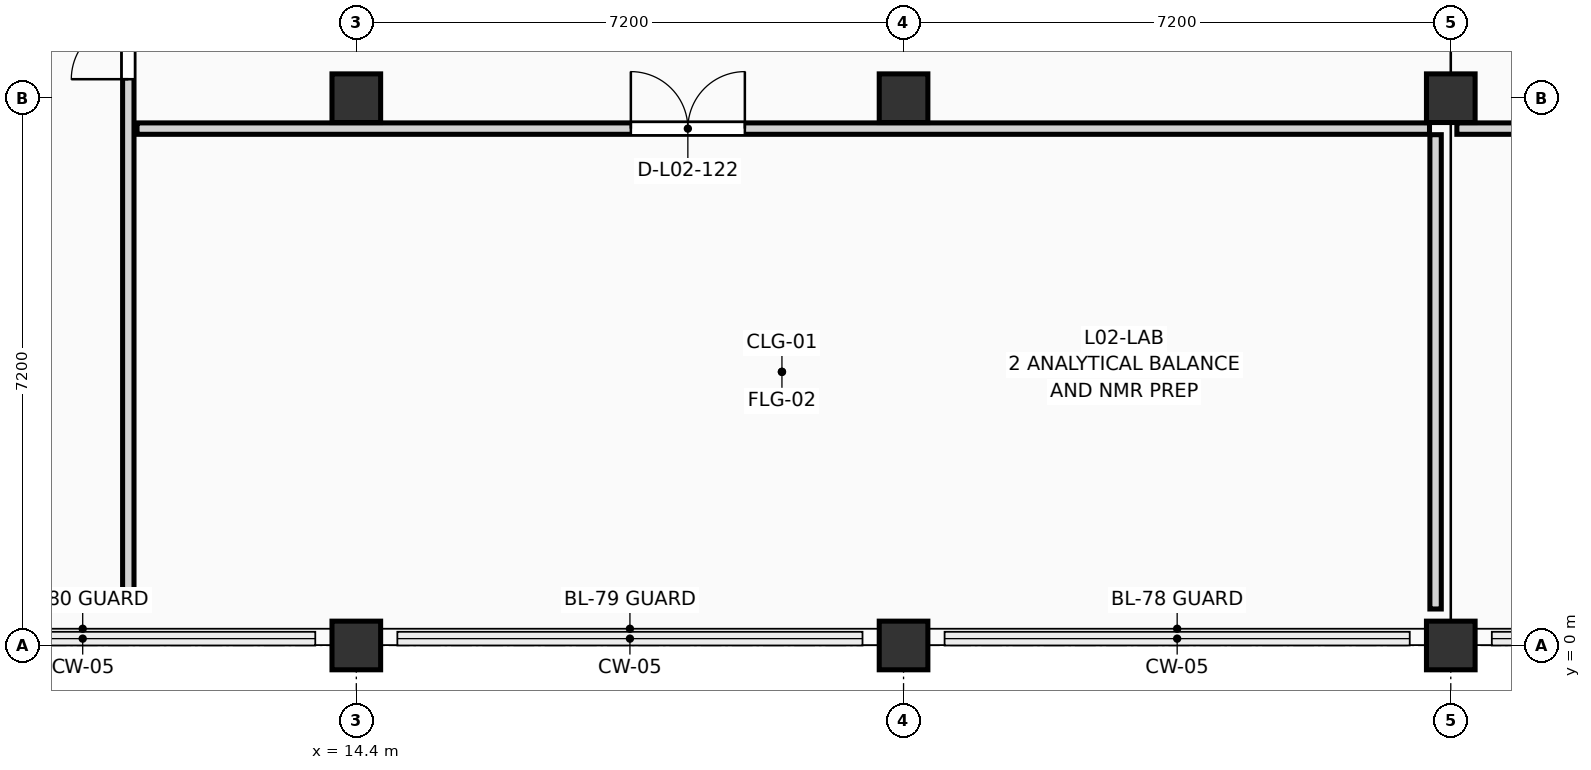
"""IFC4 building model, lengths in metres.
Left out: names, types, materials, properties, quantities, classifications, styles, units other than length and angle.
Written with IfcOpenShell. Run it as: python <this file> out.ifc"""

import sys

from ifc_helpers import new_model, si_unit, direction, frame, frame_2d, origin, origin_2d, place, context, subcontext, project, spatial, rectangle, extrude, element, fill, save


model = new_model("IFC4")
c1 = context("Model", 3, precision=1e-05, world=origin(), true_north=direction((0.0, 1.0)))
c2 = subcontext(c1, "Body", "Model", "MODEL_VIEW")
j1 = project(units=[si_unit("LENGTHUNIT", "METRE"), si_unit("PLANEANGLEUNIT", "RADIAN")], contexts=[c1])
p1 = place(None, origin())
s1 = spatial("IfcSite", under=j1, at=p1, CompositionType="ELEMENT")
p2 = place(p1, origin())
s2 = spatial("IfcBuilding", under=s1, at=p2, CompositionType="ELEMENT")
p3 = place(p2, frame((0.0, 0.0, 8.55)))
s3 = spatial("IfcBuildingStorey", under=s2, at=p3, CompositionType="ELEMENT", Elevation=8.55)
for number, where, z_axis, x_axis in (
    (1, (14.4, 0.0, 0.0), (0.0, 0.0, 1.0), (1.0, 0.0, 0.0)),
    (2, (14.4, 7.2, 0.0), (0.0, 0.0, 1.0), (1.0, 0.0, 0.0)),
    (3, (21.6, 0.0, 0.0), (0.0, 0.0, 1.0), (1.0, 0.0, 0.0)),
    (4, (21.6, 7.2, 0.0), (0.0, 0.0, 1.0), (1.0, 0.0, 0.0)),
    (5, (28.8, 0.0, 0.0), (0.0, 0.0, 1.0), (1.0, 0.0, 0.0)),
    (6, (28.8, 7.2, 0.0), (0.0, 0.0, 1.0), (1.0, 0.0, 0.0)),
):
    element("IfcColumn", number, at=place(p3, frame(where, z_axis=z_axis, x_axis=x_axis)), inside=s3, PredefinedType="COLUMN", context=c2, shape_type="SweptSolid", body=[
        extrude(rectangle(XDim=0.64, YDim=0.64, at=origin_2d()), origin(), (0.0, 0.0, 1.0), 3.6),
    ])
p4 = place(p3, frame((11.4, 0.48, 0.0), z_axis=(0.0, 0.0, 1.0), x_axis=(0.0, 1.0, 0.0)))
e7 = element("IfcWall", 7, at=p4, inside=s3, PredefinedType="PARTITIONING", context=c2, shape_type="SweptSolid", body=[
    extrude(rectangle(XDim=13.44, YDim=0.15, at=frame_2d((6.72, 0.0))), origin(), (0.0, 0.0, 1.0), 3.375),
])
p5 = place(p4, frame((6.97, 0.0, 0.0)))
e8 = element("IfcOpeningElement", 8, at=p5, cuts=e7, PredefinedType="OPENING", context=c2, shape_type="SweptSolid", body=[
    extrude(rectangle(XDim=1.5, YDim=2.2, at=frame_2d((0.75, 1.1))), frame((0.0, 0.087, 0.0), z_axis=(0.0, -1.0, 0.0), x_axis=(1.0, 0.0, 0.0)), (0.0, 0.0, 1.0), 0.174),
])
p6 = place(p3, frame((28.6, 0.48, 0.0), z_axis=(0.0, 0.0, 1.0), x_axis=(0.0, 1.0, 0.0)))
e9 = element("IfcWall", 9, at=p6, inside=s3, PredefinedType="PARTITIONING", context=c2, shape_type="SweptSolid", body=[
    extrude(rectangle(XDim=6.24, YDim=0.15, at=frame_2d((3.12, 0.0))), origin(), (0.0, 0.0, 1.0), 2.655),
])
p7 = place(p3, frame((11.515, 6.8, 0.0), z_axis=(0.0, 0.0, 1.0), x_axis=(1.0, 0.0, 0.0)))
e10 = element("IfcWall", 10, at=p7, inside=s3, PredefinedType="PARTITIONING", context=c2, shape_type="SweptSolid", body=[
    extrude(rectangle(XDim=17.005, YDim=0.15, at=frame_2d((8.502, 0.0))), origin(), (0.0, 0.0, 1.0), 3.375),
])
p8 = place(p7, frame((6.497, 0.0, 0.0)))
e11 = element("IfcOpeningElement", 11, at=p8, cuts=e10, PredefinedType="OPENING", context=c2, shape_type="SweptSolid", body=[
    extrude(rectangle(XDim=1.5, YDim=2.2, at=frame_2d((0.75, 1.1))), frame((0.0, 0.087, 0.0), z_axis=(0.0, -1.0, 0.0), x_axis=(1.0, 0.0, 0.0)), (0.0, 0.0, 1.0), 0.174),
])
p9 = place(p3, frame((28.88, 6.8, 0.0), z_axis=(0.0, 0.0, 1.0), x_axis=(1.0, 0.0, 0.0)))
e12 = element("IfcWall", 12, at=p9, inside=s3, PredefinedType="PARTITIONING", context=c2, shape_type="SweptSolid", body=[
    extrude(rectangle(XDim=28.24, YDim=0.15, at=frame_2d((14.12, 0.0))), origin(), (0.0, 0.0, 1.0), 3.375),
])
p10 = place(p9, frame((10.63, 0.0, 0.0)))
e13 = element("IfcOpeningElement", 13, at=p10, cuts=e12, PredefinedType="OPENING", context=c2, shape_type="SweptSolid", body=[
    extrude(rectangle(XDim=1.5, YDim=2.2, at=frame_2d((0.75, 1.1))), frame((0.0, 0.087, 0.0), z_axis=(0.0, -1.0, 0.0), x_axis=(1.0, 0.0, 0.0)), (0.0, 0.0, 1.0), 0.174),
])
p11 = place(p5, origin())
e14 = element("IfcDoor", 14, at=p11, inside=s3, OperationType="DOUBLE_DOOR_SINGLE_SWING", PredefinedType="DOOR", context=c2, shape_type="SweptSolid", body=[
    extrude(rectangle(XDim=1.5, YDim=2.2, at=frame_2d((0.75, 1.1))), frame((0.0, 0.025, 0.0), z_axis=(0.0, -1.0, 0.0), x_axis=(1.0, 0.0, 0.0)), (0.0, 0.0, 1.0), 0.05),
])
fill(e8, e14)
p12 = place(p8, origin())
e15 = element("IfcDoor", 15, at=p12, inside=s3, OperationType="DOUBLE_DOOR_SINGLE_SWING", PredefinedType="DOOR", context=c2, shape_type="SweptSolid", body=[
    extrude(rectangle(XDim=1.5, YDim=2.2, at=frame_2d((0.75, 1.1))), frame((0.0, 0.025, 0.0), z_axis=(0.0, -1.0, 0.0), x_axis=(1.0, 0.0, 0.0)), (0.0, 0.0, 1.0), 0.05),
])
fill(e11, e15)
save(model, sys.argv[1])
